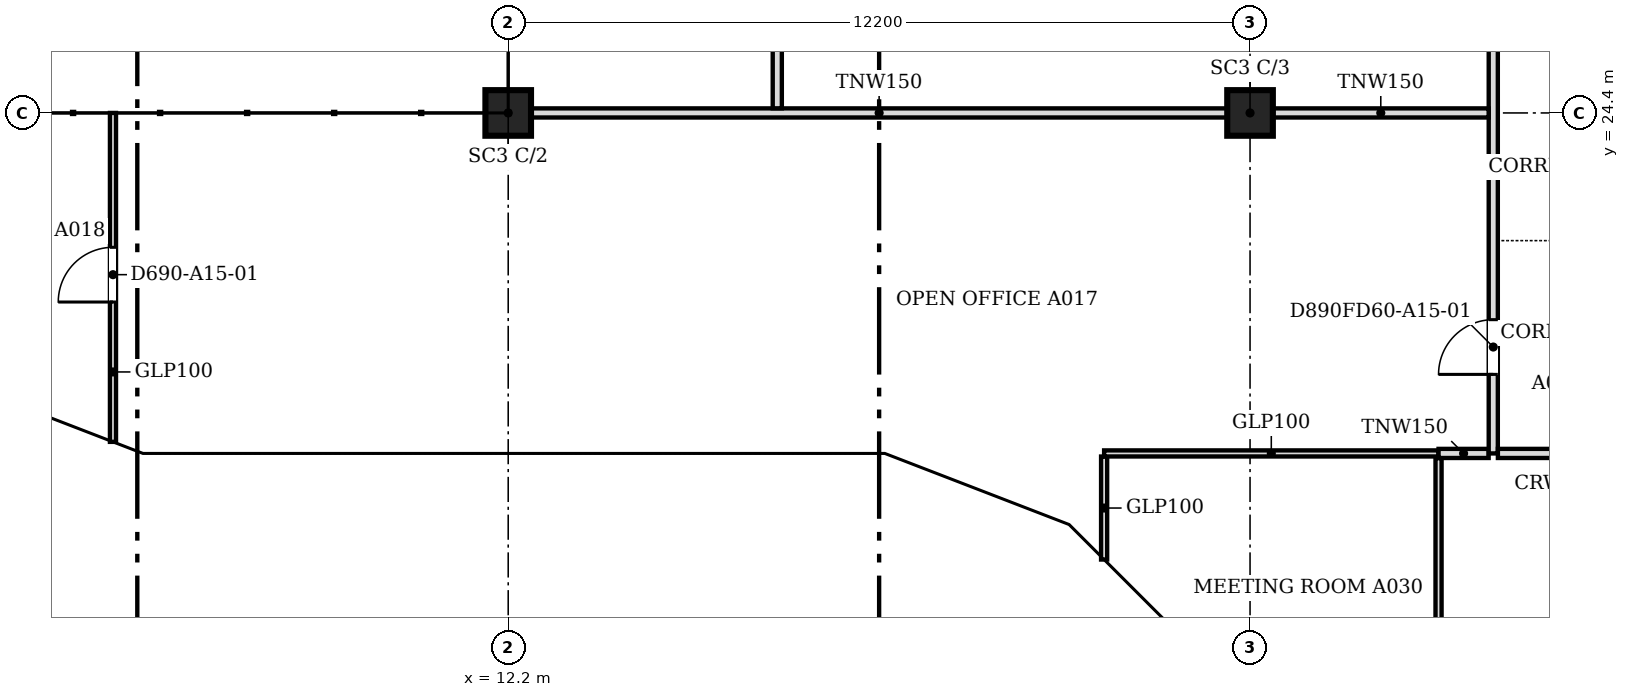
"""IFC4 building model, lengths in metres.
Left out: names, types, materials, properties, quantities, classifications, styles, units other than length and angle.
Written with IfcOpenShell. Run it as: python <this file> out.ifc"""

import sys

from ifc_helpers import new_model, si_unit, direction, frame, frame_2d, origin, origin_2d, place, context, subcontext, project, spatial, polyline, rectangle, outline, extrude, faceted_brep, source, transform, mapped, element, fill, save


model = new_model("IFC4")
c1 = context("Model", 3, precision=1e-05, world=origin(), true_north=direction((0.0, 1.0)))
c2 = subcontext(c1, "Body", "Model", "MODEL_VIEW")
j1 = project(units=[si_unit("LENGTHUNIT", "METRE"), si_unit("PLANEANGLEUNIT", "RADIAN")], contexts=[c1])
p1 = place(None, origin())
s1 = spatial("IfcSite", under=j1, at=p1, CompositionType="ELEMENT")
p2 = place(p1, origin())
s2 = spatial("IfcBuilding", under=s1, at=p2, CompositionType="ELEMENT")
p3 = place(p2, frame((0.0, 0.0, 166.8)))
s3 = spatial("IfcBuildingStorey", under=s2, at=p3, CompositionType="ELEMENT", Elevation=166.8)
for number, where, z_axis, x_axis in (
    (1, (12.2, 24.4, 0.0), (0.0, 0.0, 1.0), (1.0, 0.0, 0.0)),
    (2, (24.4, 24.4, 0.0), (0.0, 0.0, 1.0), (1.0, 0.0, 0.0)),
):
    element("IfcColumn", number, at=place(p3, frame(where, z_axis=z_axis, x_axis=x_axis)), inside=s3, PredefinedType="COLUMN", context=c2, shape_type="SweptSolid", body=[
        extrude(rectangle(XDim=0.75, YDim=0.75, at=origin_2d()), origin(), (0.0, 0.0, 1.0), 3.6),
    ])
m1 = source(origin(), c2, "Body", "Brep", [
    faceted_brep([(0.053, -0.25, 0.0), (3.003, -0.25, 3.8), (0.053, -0.25, 7.6), (0.0, -0.25, 7.532), (0.0, -0.25, 0.068), (0.106, 0.25, 7.532), (2.957, 0.25, 3.86), (2.957, 0.25, 3.74), (0.106, 0.25, 0.068), (3.003, 0.0, 3.8), (0.053, 0.0, 0.0), (0.053, 0.0, 7.6)], [[[0, 1, 2, 3, 4]], [[5, 6, 7, 8]], [[8, 7, 9, 1, 0, 10]], [[6, 5, 11, 2, 1, 9]], [[3, 2, 11]], [[10, 0, 4]], [[8, 10, 4, 3, 11, 5]], [[9, 7, 6]]]),
])
p4 = place(p3, frame((3.344, 19.631, -3.8), z_axis=(0.0, 0.0, 1.0), x_axis=(0.933007896601, -0.359855894603, 0.0)))
e3 = element("IfcWall", 3, at=p4, inside=s3, PredefinedType="SOLIDWALL", context=c2, shape_type="MappedRepresentation", body=[
    mapped(m1, transform((0.0, 0.0, 0.0), scale=1.0)),
])
m2 = source(origin(), c2, "Body", "SweptSolid", [
    extrude(outline(polyline([(0.253, 0.665), (2.687, 3.8), (0.253, 6.935), (0.253, 0.665)])), frame((0.0, 0.26, 0.0), z_axis=(0.0, -1.0, 0.0), x_axis=(1.0, 0.0, 0.0)), (0.0, 0.0, 1.0), 0.52),
])
p5 = place(p4, origin())
e4 = element("IfcOpeningElement", 4, at=p5, cuts=e3, PredefinedType="OPENING", context=c2, shape_type="MappedRepresentation", body=[
    mapped(m2, transform((0.0, 0.0, 0.0), scale=1.0)),
])
m3 = source(origin(), c2, "Body", "Brep", [
    faceted_brep([(3.003, -0.25, 0.0), (6.053, -0.25, 3.8), (3.003, -0.25, 7.6), (0.0, -0.25, 3.8), (0.047, 0.25, 3.859), (3.003, 0.25, 7.6), (6.053, 0.25, 3.8), (3.003, 0.25, 0.0), (0.047, 0.25, 3.741), (0.0, 0.0, 3.8)], [[[0, 1, 2, 3]], [[4, 5, 6, 7, 8]], [[7, 6, 1, 0]], [[6, 5, 2, 1]], [[5, 4, 9, 3, 2]], [[8, 7, 0, 3, 9]], [[8, 9, 4]]]),
])
p6 = place(p3, frame((6.146, 18.55, -3.8), z_axis=(0.0, 0.0, 1.0), x_axis=(1.0, 0.0, 0.0)))
e5 = element("IfcWall", 5, at=p6, inside=s3, PredefinedType="SOLIDWALL", context=c2, shape_type="MappedRepresentation", body=[
    mapped(m3, transform((0.0, 0.0, 0.0), scale=1.0)),
])
m4 = source(origin(), c2, "Body", "SweptSolid", [
    extrude(outline(polyline([(3.005, 0.401), (5.733, 3.8), (3.005, 7.199), (0.319, 3.8), (3.005, 0.401)])), frame((0.0, 0.26, 0.0), z_axis=(0.0, -1.0, 0.0), x_axis=(1.0, 0.0, 0.0)), (0.0, 0.0, 1.0), 0.52),
])
p7 = place(p6, origin())
e6 = element("IfcOpeningElement", 6, at=p7, cuts=e5, PredefinedType="OPENING", context=c2, shape_type="MappedRepresentation", body=[
    mapped(m4, transform((0.0, 0.0, 0.0), scale=1.0)),
])
m5 = source(origin(), c2, "Body", "Brep", [
    faceted_brep([(3.05, -0.25, 0.0), (6.1, -0.25, 3.743), (6.1, -0.25, 3.857), (3.05, -0.25, 7.6), (0.0, -0.25, 3.8), (0.0, 0.25, 3.8), (3.05, 0.25, 7.6), (6.146, 0.25, 3.8), (3.05, 0.25, 0.0), (6.146, -0.0, 3.8)], [[[0, 1, 2, 3, 4]], [[5, 6, 7, 8]], [[8, 7, 9, 1, 0]], [[7, 6, 3, 2, 9]], [[6, 5, 4, 3]], [[5, 8, 0, 4]], [[1, 9, 2]]]),
])
p8 = place(p3, frame((12.2, 18.55, -3.8), z_axis=(0.0, 0.0, 1.0), x_axis=(1.0, 0.0, 0.0)))
e7 = element("IfcWall", 7, at=p8, inside=s3, PredefinedType="SOLIDWALL", context=c2, shape_type="MappedRepresentation", body=[
    mapped(m5, transform((0.0, 0.0, 0.0), scale=1.0)),
])
m6 = source(origin(), c2, "Body", "SweptSolid", [
    extrude(outline(polyline([(3.052, 0.397), (5.824, 3.8), (3.052, 7.202), (0.321, 3.8), (3.052, 0.397)])), frame((0.0, 0.26, 0.0), z_axis=(0.0, -1.0, 0.0), x_axis=(1.0, 0.0, 0.0)), (0.0, 0.0, 1.0), 0.52),
])
p9 = place(p8, origin())
e8 = element("IfcOpeningElement", 8, at=p9, cuts=e7, PredefinedType="OPENING", context=c2, shape_type="MappedRepresentation", body=[
    mapped(m6, transform((0.0, 0.0, 0.0), scale=1.0)),
])
m7 = source(origin(), c2, "Body", "Brep", [
    faceted_brep([(3.096, -0.25, 7.536), (0.047, -0.25, 3.856), (0.047, -0.25, 3.744), (3.096, -0.25, 0.064), (0.0, 0.25, 3.8), (3.149, 0.25, 7.6), (3.202, 0.25, 7.536), (3.202, 0.25, 0.064), (3.149, 0.25, 0.0), (3.149, -0.0, 0.0), (3.149, -0.0, 7.6), (0.0, 0.0, 3.8)], [[[0, 1, 2, 3]], [[4, 5, 6, 7, 8]], [[8, 7, 9]], [[6, 5, 10]], [[5, 4, 11, 1, 0, 10]], [[4, 8, 9, 3, 2, 11]], [[11, 2, 1]], [[3, 9, 7, 6, 10, 0]]]),
])
p10 = place(p3, frame((18.346, 18.55, -3.8), z_axis=(0.0, 0.0, 1.0), x_axis=(0.932985567668, -0.359913782069, 0.0)))
e9 = element("IfcWall", 9, at=p10, inside=s3, PredefinedType="SOLIDWALL", context=c2, shape_type="MappedRepresentation", body=[
    mapped(m7, transform((0.0, 0.0, 0.0), scale=1.0)),
])
m8 = source(origin(), c2, "Body", "SweptSolid", [
    extrude(outline(polyline([(2.949, 6.967), (0.325, 3.8), (2.949, 0.633), (2.949, 6.967)])), frame((0.0, 0.26, 0.0), z_axis=(0.0, -1.0, 0.0), x_axis=(1.0, 0.0, 0.0)), (0.0, 0.0, 1.0), 0.52),
])
p11 = place(p10, origin())
e10 = element("IfcOpeningElement", 10, at=p11, cuts=e9, PredefinedType="OPENING", context=c2, shape_type="MappedRepresentation", body=[
    mapped(m8, transform((0.0, 0.0, 0.0), scale=1.0)),
])
m9 = source(origin(), c2, "Body", "Brep", [
    faceted_brep([(0.106, -0.25, 0.064), (3.156, -0.25, 3.736), (3.156, -0.25, 3.864), (0.106, -0.25, 7.536), (0.0, 0.25, 7.536), (0.053, 0.25, 7.6), (3.209, 0.25, 3.8), (0.053, 0.25, 0.0), (0.0, 0.25, 0.064), (3.209, -0.0, 3.8), (0.053, 0.0, 0.0), (0.053, 0.0, 7.6)], [[[0, 1, 2, 3]], [[4, 5, 6, 7, 8]], [[7, 6, 9, 1, 0, 10]], [[6, 5, 11, 3, 2, 9]], [[5, 4, 11]], [[8, 7, 10]], [[8, 10, 0, 3, 11, 4]], [[1, 9, 2]]]),
])
p12 = place(p3, frame((21.248, 17.454, -3.8), z_axis=(0.0, 0.0, 1.0), x_axis=(0.707106781187, -0.707106781187, 0.0)))
e11 = element("IfcWall", 11, at=p12, inside=s3, PredefinedType="SOLIDWALL", context=c2, shape_type="MappedRepresentation", body=[
    mapped(m9, transform((0.0, 0.0, 0.0), scale=1.0)),
])
m10 = source(origin(), c2, "Body", "SweptSolid", [
    extrude(outline(polyline([(0.253, 0.632), (2.884, 3.8), (0.253, 6.968), (0.253, 0.632)])), frame((0.0, 0.26, 0.0), z_axis=(0.0, -1.0, 0.0), x_axis=(1.0, 0.0, 0.0)), (0.0, 0.0, 1.0), 0.52),
])
p13 = place(p12, origin())
e12 = element("IfcOpeningElement", 12, at=p13, cuts=e11, PredefinedType="OPENING", context=c2, shape_type="MappedRepresentation", body=[
    mapped(m10, transform((0.0, 0.0, 0.0), scale=1.0)),
])
p14 = place(p2, frame((0.0, 0.0, 170.6)))
s4 = spatial("IfcBuildingStorey", under=s2, at=p14, CompositionType="ELEMENT", Elevation=170.6)
m11 = source(origin(), c2, "Body", "Brep", [
    faceted_brep([(2.95, -0.25, 0.0), (2.997, -0.25, 0.059), (2.997, -0.25, 7.541), (2.95, -0.25, 7.6), (0.0, -0.25, 3.8), (0.053, 0.25, 3.868), (2.904, 0.25, 7.54), (2.904, 0.25, 0.06), (0.053, 0.25, 3.732), (2.95, 0.0, 0.0), (2.95, 0.0, 7.6), (0.0, 0.0, 3.8)], [[[0, 1, 2, 3, 4]], [[5, 6, 7, 8]], [[1, 0, 9]], [[10, 3, 2]], [[6, 5, 11, 4, 3, 10]], [[8, 7, 9, 0, 4, 11]], [[8, 11, 5]], [[1, 9, 7, 6, 10, 2]]]),
])
p15 = place(p14, frame((3.394, 19.612, -3.8), z_axis=(0.0, 0.0, 1.0), x_axis=(0.932990326376, -0.359901446078, 0.0)))
e13 = element("IfcWall", 13, at=p15, inside=s4, PredefinedType="SOLIDWALL", context=c2, shape_type="MappedRepresentation", body=[
    mapped(m11, transform((0.0, 0.0, 0.0), scale=1.0)),
])
m12 = source(origin(), c2, "Body", "SweptSolid", [
    extrude(outline(polyline([(2.75, 6.935), (0.316, 3.8), (2.75, 0.665), (2.75, 6.935)])), frame((0.0, 0.26, 0.0), z_axis=(0.0, -1.0, 0.0), x_axis=(1.0, 0.0, 0.0)), (0.0, 0.0, 1.0), 0.52),
])
p16 = place(p15, origin())
e14 = element("IfcOpeningElement", 14, at=p16, cuts=e13, PredefinedType="OPENING", context=c2, shape_type="MappedRepresentation", body=[
    mapped(m12, transform((0.0, 0.0, 0.0), scale=1.0)),
])
m13 = source(origin(), c2, "Body", "Brep", [
    faceted_brep([(0.047, -0.25, 0.0), (3.05, -0.25, 3.8), (0.047, -0.25, 7.6), (0.0, -0.25, 7.54), (0.0, -0.25, 0.06), (0.093, 0.25, 7.541), (3.05, 0.25, 3.8), (0.093, 0.25, 0.059), (0.047, 0.0, 0.0), (0.047, 0.0, 7.6)], [[[0, 1, 2, 3, 4]], [[5, 6, 7]], [[7, 6, 1, 0, 8]], [[6, 5, 9, 2, 1]], [[3, 2, 9]], [[8, 0, 4]], [[7, 8, 4, 3, 9, 5]]]),
])
p17 = place(p14, frame((6.1, 18.55, -3.8), z_axis=(0.0, 0.0, 1.0), x_axis=(1.0, 0.0, 0.0)))
e15 = element("IfcWall", 15, at=p17, inside=s4, PredefinedType="SOLIDWALL", context=c2, shape_type="MappedRepresentation", body=[
    mapped(m13, transform((0.0, 0.0, 0.0), scale=1.0)),
])
m14 = source(origin(), c2, "Body", "SweptSolid", [
    extrude(outline(polyline([(0.247, 0.656), (2.731, 3.8), (0.247, 6.944), (0.247, 0.656)])), frame((0.0, 0.26, 0.0), z_axis=(0.0, -1.0, 0.0), x_axis=(1.0, 0.0, 0.0)), (0.0, 0.0, 1.0), 0.52),
])
p18 = place(p17, origin())
e16 = element("IfcOpeningElement", 16, at=p18, cuts=e15, PredefinedType="OPENING", context=c2, shape_type="MappedRepresentation", body=[
    mapped(m14, transform((0.0, 0.0, 0.0), scale=1.0)),
])
m15 = source(origin(), c2, "Body", "SweptSolid", [
    extrude(outline(polyline([(3.05, 0.0), (6.1, 3.8), (3.05, 7.6), (0.0, 3.8), (3.05, 0.0)])), frame((0.0, 0.25, 0.0), z_axis=(0.0, -1.0, 0.0), x_axis=(1.0, 0.0, 0.0)), (0.0, 0.0, 1.0), 0.5),
])
p19 = place(p14, frame((9.15, 18.55, -3.8), z_axis=(0.0, 0.0, 1.0), x_axis=(1.0, 0.0, 0.0)))
e17 = element("IfcWall", 17, at=p19, inside=s4, PredefinedType="SOLIDWALL", context=c2, shape_type="MappedRepresentation", body=[
    mapped(m15, transform((0.0, 0.0, 0.0), scale=1.0)),
])
m16 = source(origin(), c2, "Body", "SweptSolid", [
    extrude(outline(polyline([(3.05, 0.399), (5.78, 3.8), (3.05, 7.2), (0.321, 3.8), (3.05, 0.399)])), frame((0.0, 0.26, 0.0), z_axis=(0.0, -1.0, 0.0), x_axis=(1.0, 0.0, 0.0)), (0.0, 0.0, 1.0), 0.52),
])
p20 = place(p19, origin())
e18 = element("IfcOpeningElement", 18, at=p20, cuts=e17, PredefinedType="OPENING", context=c2, shape_type="MappedRepresentation", body=[
    mapped(m16, transform((0.0, 0.0, 0.0), scale=1.0)),
])
m17 = source(origin(), c2, "Body", "Brep", [
    faceted_brep([(3.05, -0.25, 7.543), (0.0, -0.25, 3.8), (3.05, -0.25, 0.057), (0.0, 0.25, 3.8), (3.096, 0.25, 7.6), (3.143, 0.25, 7.543), (3.143, 0.25, 0.056), (3.096, 0.25, 0.0), (3.096, -0.0, 0.0), (3.096, -0.0, 7.6)], [[[0, 1, 2]], [[3, 4, 5, 6, 7]], [[7, 6, 8]], [[5, 4, 9]], [[4, 3, 1, 0, 9]], [[3, 7, 8, 2, 1]], [[2, 8, 6, 5, 9, 0]]]),
])
p21 = place(p14, frame((15.25, 18.55, -3.8), z_axis=(0.0, 0.0, 1.0), x_axis=(1.0, 0.0, 0.0)))
e19 = element("IfcWall", 19, at=p21, inside=s4, PredefinedType="SOLIDWALL", context=c2, shape_type="MappedRepresentation", body=[
    mapped(m17, transform((0.0, 0.0, 0.0), scale=1.0)),
])
m18 = source(origin(), c2, "Body", "SweptSolid", [
    extrude(outline(polyline([(2.896, 6.959), (0.323, 3.8), (2.896, 0.641), (2.896, 6.959)])), frame((0.0, 0.26, 0.0), z_axis=(0.0, -1.0, 0.0), x_axis=(1.0, 0.0, 0.0)), (0.0, 0.0, 1.0), 0.52),
])
p22 = place(p21, origin())
e20 = element("IfcOpeningElement", 20, at=p22, cuts=e19, PredefinedType="OPENING", context=c2, shape_type="MappedRepresentation", body=[
    mapped(m18, transform((0.0, 0.0, 0.0), scale=1.0)),
])
m19 = source(origin(), c2, "Body", "Brep", [
    faceted_brep([(0.093, -0.25, 0.056), (3.143, -0.25, 3.736), (3.143, -0.25, 3.864), (0.093, -0.25, 7.544), (0.0, 0.25, 7.543), (0.047, 0.25, 7.6), (3.196, 0.25, 3.8), (0.047, 0.25, 0.0), (0.0, 0.25, 0.057), (3.196, -0.0, 3.8), (0.047, 0.0, 0.0), (0.047, 0.0, 7.6)], [[[0, 1, 2, 3]], [[4, 5, 6, 7, 8]], [[7, 6, 9, 1, 0, 10]], [[6, 5, 11, 3, 2, 9]], [[5, 4, 11]], [[8, 7, 10]], [[8, 10, 0, 3, 11, 4]], [[1, 9, 2]]]),
])
p23 = place(p14, frame((18.303, 18.567, -3.8), z_axis=(0.0, 0.0, 1.0), x_axis=(0.932978940178, -0.359930961693, 0.0)))
e21 = element("IfcWall", 21, at=p23, inside=s4, PredefinedType="SOLIDWALL", context=c2, shape_type="MappedRepresentation", body=[
    mapped(m19, transform((0.0, 0.0, 0.0), scale=1.0)),
])
m20 = source(origin(), c2, "Body", "SweptSolid", [
    extrude(outline(polyline([(0.247, 0.633), (2.871, 3.8), (0.247, 6.967), (0.247, 0.633)])), frame((0.0, 0.26, 0.0), z_axis=(0.0, -1.0, 0.0), x_axis=(1.0, 0.0, 0.0)), (0.0, 0.0, 1.0), 0.52),
])
p24 = place(p23, origin())
e22 = element("IfcOpeningElement", 22, at=p24, cuts=e21, PredefinedType="OPENING", context=c2, shape_type="MappedRepresentation", body=[
    mapped(m20, transform((0.0, 0.0, 0.0), scale=1.0)),
])
m21 = source(origin(), c2, "Body", "Brep", [
    faceted_brep([(3.103, -0.25, 7.536), (0.053, -0.25, 3.864), (0.053, -0.25, 3.736), (3.103, -0.25, 0.064), (0.0, 0.25, 3.8), (3.156, 0.25, 7.6), (3.209, 0.25, 7.536), (3.209, 0.25, 0.064), (3.156, 0.25, 0.0), (3.156, -0.0, 0.0), (3.156, -0.0, 7.6), (0.0, 0.0, 3.8)], [[[0, 1, 2, 3]], [[4, 5, 6, 7, 8]], [[8, 7, 9]], [[6, 5, 10]], [[5, 4, 11, 1, 0, 10]], [[4, 8, 9, 3, 2, 11]], [[2, 1, 11]], [[3, 9, 7, 6, 10, 0]]]),
])
p25 = place(p14, frame((21.285, 17.417, -3.8), z_axis=(0.0, 0.0, 1.0), x_axis=(0.707106781187, -0.707106781187, 0.0)))
e23 = element("IfcWall", 23, at=p25, inside=s4, PredefinedType="SOLIDWALL", context=c2, shape_type="MappedRepresentation", body=[
    mapped(m21, transform((0.0, 0.0, 0.0), scale=1.0)),
])
m22 = source(origin(), c2, "Body", "SweptSolid", [
    extrude(outline(polyline([(2.956, 6.968), (0.325, 3.8), (2.956, 0.632), (2.956, 6.968)])), frame((0.0, 0.26, 0.0), z_axis=(0.0, -1.0, 0.0), x_axis=(1.0, 0.0, 0.0)), (0.0, 0.0, 1.0), 0.52),
])
p26 = place(p25, origin())
e24 = element("IfcOpeningElement", 24, at=p26, cuts=e23, PredefinedType="OPENING", context=c2, shape_type="MappedRepresentation", body=[
    mapped(m22, transform((0.0, 0.0, 0.0), scale=1.0)),
])
p27 = place(p3, frame((27.5, 10.276, 0.0), z_axis=(0.0, 0.0, 1.0), x_axis=(0.0, 1.0, 0.0)))
e25 = element("IfcWall", 25, at=p27, inside=s3, PredefinedType="PARTITIONING", context=c2, shape_type="SweptSolid", body=[
    extrude(rectangle(XDim=8.448, YDim=0.1, at=frame_2d((4.224, 0.0))), origin(), (0.0, 0.0, 1.0), 3.067),
])
m23 = source(origin(), c2, "Body", "SweptSolid", [
    extrude(rectangle(XDim=0.9, YDim=2.1, at=frame_2d((0.45, 1.05))), frame((0.0, 0.06, 0.0), z_axis=(0.0, -1.0, 0.0), x_axis=(1.0, 0.0, 0.0)), (0.0, 0.0, 1.0), 0.12),
])
p28 = place(p27, frame((3.8, 0.0, 0.0)))
e26 = element("IfcOpeningElement", 26, at=p28, cuts=e25, PredefinedType="OPENING", context=c2, shape_type="MappedRepresentation", body=[
    mapped(m23, transform((0.0, 0.0, 0.0), scale=1.0)),
])
p29 = place(p3, frame((22.0, 17.055, 0.0), z_axis=(0.0, 0.0, 1.0), x_axis=(0.0, 1.0, 0.0)))
e27 = element("IfcWall", 27, at=p29, inside=s3, PredefinedType="PARTITIONING", context=c2, shape_type="SweptSolid", body=[
    extrude(rectangle(XDim=1.694, YDim=0.1, at=frame_2d((0.847, 0.0))), origin(), (0.0, 0.0, 1.0), 3.067),
])
p30 = place(p3, frame((22.0, 18.8, 0.0), z_axis=(0.0, 0.0, 1.0), x_axis=(1.0, 0.0, 0.0)))
e28 = element("IfcWall", 28, at=p30, inside=s3, PredefinedType="PARTITIONING", context=c2, shape_type="SweptSolid", body=[
    extrude(rectangle(XDim=5.499, YDim=0.1, at=frame_2d((2.75, 0.0))), origin(), (0.0, 0.0, 1.0), 3.067),
])
p31 = place(p3, frame((27.5, 18.8, 0.0), z_axis=(0.0, 0.0, 1.0), x_axis=(1.0, 0.0, 0.0)))
e29 = element("IfcWall", 29, at=p31, inside=s3, PredefinedType="PARTITIONING", context=c2, shape_type="SweptSolid", body=[
    extrude(rectangle(XDim=0.824, YDim=0.15, at=frame_2d((0.412, 0.0))), origin(), (0.0, 0.0, 1.0), 3.067),
])
p32 = place(p3, frame((28.4, 18.8, 0.0), z_axis=(0.0, 0.0, 1.0), x_axis=(0.0, 1.0, 0.0)))
e30 = element("IfcWall", 30, at=p32, inside=s3, PredefinedType="PARTITIONING", context=c2, shape_type="SweptSolid", body=[
    extrude(rectangle(XDim=26.824, YDim=0.15, at=frame_2d((13.412, 0.0))), origin(), (0.0, 0.0, 1.0), 3.067),
])
m24 = source(origin(), c2, "Body", "SweptSolid", [
    extrude(rectangle(XDim=0.9, YDim=2.1, at=frame_2d((0.45, 1.05))), frame((0.0, 0.085, 0.0), z_axis=(0.0, -1.0, 0.0), x_axis=(1.0, 0.0, 0.0)), (0.0, 0.0, 1.0), 0.17),
])
p33 = place(p32, frame((1.3, 0.0, 0.0)))
e31 = element("IfcOpeningElement", 31, at=p33, cuts=e30, PredefinedType="OPENING", context=c2, shape_type="MappedRepresentation", body=[
    mapped(m24, transform((0.0, 0.0, 0.0), scale=1.0)),
])
m25 = source(origin(), c2, "Body", "SweptSolid", [
    extrude(rectangle(XDim=1.0, YDim=2.1, at=frame_2d((0.5, 1.05))), frame((0.0, 0.085, 0.0), z_axis=(0.0, -1.0, 0.0), x_axis=(1.0, 0.0, 0.0)), (0.0, 0.0, 1.0), 0.17),
])
p34 = place(p32, frame((23.351, 0.0, 0.0)))
e32 = element("IfcOpeningElement", 32, at=p34, cuts=e30, PredefinedType="OPENING", context=c2, shape_type="MappedRepresentation", body=[
    mapped(m25, transform((0.0, 0.0, 0.0), scale=1.0)),
])
p35 = place(p32, frame((8.1, 0.0, 0.0)))
e33 = element("IfcOpeningElement", 33, at=p35, cuts=e30, PredefinedType="OPENING", context=c2, shape_type="MappedRepresentation", body=[
    mapped(m25, transform((0.0, 0.0, 0.0), scale=1.0)),
])
p36 = place(p32, frame((15.8, 0.0, 0.0)))
e34 = element("IfcOpeningElement", 34, at=p36, cuts=e30, PredefinedType="OPENING", context=c2, shape_type="MappedRepresentation", body=[
    mapped(m24, transform((0.0, 0.0, 0.0), scale=1.0)),
])
p37 = place(p3, frame((28.476, 18.8, 0.0), z_axis=(0.0, 0.0, 1.0), x_axis=(1.0, 0.0, 0.0)))
e35 = element("IfcWall", 35, at=p37, inside=s3, PredefinedType="PARTITIONING", context=c2, shape_type="SweptSolid", body=[
    extrude(rectangle(XDim=1.948, YDim=0.15, at=frame_2d((0.974, 0.0))), origin(), (0.0, 0.0, 1.0), 3.067),
])
p38 = place(p3, frame((5.7, 18.99, 0.0), z_axis=(0.0, 0.0, 1.0), x_axis=(0.0, 1.0, 0.0)))
e36 = element("IfcWall", 36, at=p38, inside=s3, PredefinedType="PARTITIONING", context=c2, shape_type="SweptSolid", body=[
    extrude(rectangle(XDim=5.41, YDim=0.1, at=frame_2d((2.705, 0.0))), origin(), (0.0, 0.0, 1.0), 3.067),
])
p39 = place(p38, frame((2.3, 0.0, 0.0)))
e37 = element("IfcOpeningElement", 37, at=p39, cuts=e36, PredefinedType="OPENING", context=c2, shape_type="MappedRepresentation", body=[
    mapped(m23, transform((0.0, 0.0, 0.0), scale=1.0)),
])
p40 = place(p3, frame((12.576, 24.4, 0.0), z_axis=(0.0, 0.0, 1.0), x_axis=(1.0, 0.0, 0.0)))
e38 = element("IfcWall", 38, at=p40, inside=s3, PredefinedType="PARTITIONING", context=c2, shape_type="SweptSolid", body=[
    extrude(rectangle(XDim=11.448, YDim=0.15, at=frame_2d((5.724, 0.0))), origin(), (0.0, 0.0, 1.0), 3.067),
])
p41 = place(p3, frame((24.776, 24.4, 0.0), z_axis=(0.0, 0.0, 1.0), x_axis=(1.0, 0.0, 0.0)))
e39 = element("IfcWall", 39, at=p41, inside=s3, PredefinedType="PARTITIONING", context=c2, shape_type="SweptSolid", body=[
    extrude(rectangle(XDim=3.548, YDim=0.15, at=frame_2d((1.774, 0.0))), origin(), (0.0, 0.0, 1.0), 3.067),
])
p42 = place(p3, frame((16.625, 24.476, 0.0), z_axis=(0.0, 0.0, 1.0), x_axis=(0.0, 1.0, 0.0)))
e40 = element("IfcWall", 40, at=p42, inside=s3, PredefinedType="PARTITIONING", context=c2, shape_type="SweptSolid", body=[
    extrude(rectangle(XDim=6.024, YDim=0.15, at=frame_2d((3.012, 0.0))), origin(), (0.0, 0.0, 1.0), 3.067),
])
p43 = place(p42, frame((2.6, 0.0, 0.0)))
e41 = element("IfcOpeningElement", 41, at=p43, cuts=e40, PredefinedType="OPENING", context=c2, shape_type="MappedRepresentation", body=[
    mapped(m24, transform((0.0, 0.0, 0.0), scale=1.0)),
])
m26 = source(origin(), c2, "Body", "SweptSolid", [
    extrude(rectangle(XDim=0.9, YDim=2.1, at=frame_2d((0.45, 1.05))), frame((0.0, 0.025, 0.0), z_axis=(0.0, -1.0, 0.0), x_axis=(1.0, 0.0, 0.0)), (0.0, 0.0, 1.0), 0.05),
])
p44 = place(p33, origin())
e42 = element("IfcDoor", 42, at=p44, inside=s3, OperationType="SINGLE_SWING_LEFT", PredefinedType="DOOR", context=c2, shape_type="MappedRepresentation", body=[
    mapped(m26, transform((0.0, 0.0, 0.0), scale=1.0)),
])
fill(e31, e42)
p45 = place(p39, origin())
e43 = element("IfcDoor", 43, at=p45, inside=s3, OperationType="SINGLE_SWING_LEFT", PredefinedType="DOOR", context=c2, shape_type="MappedRepresentation", body=[
    mapped(m26, transform((0.0, 0.0, 0.0), scale=1.0)),
])
fill(e37, e43)
save(model, sys.argv[1])
